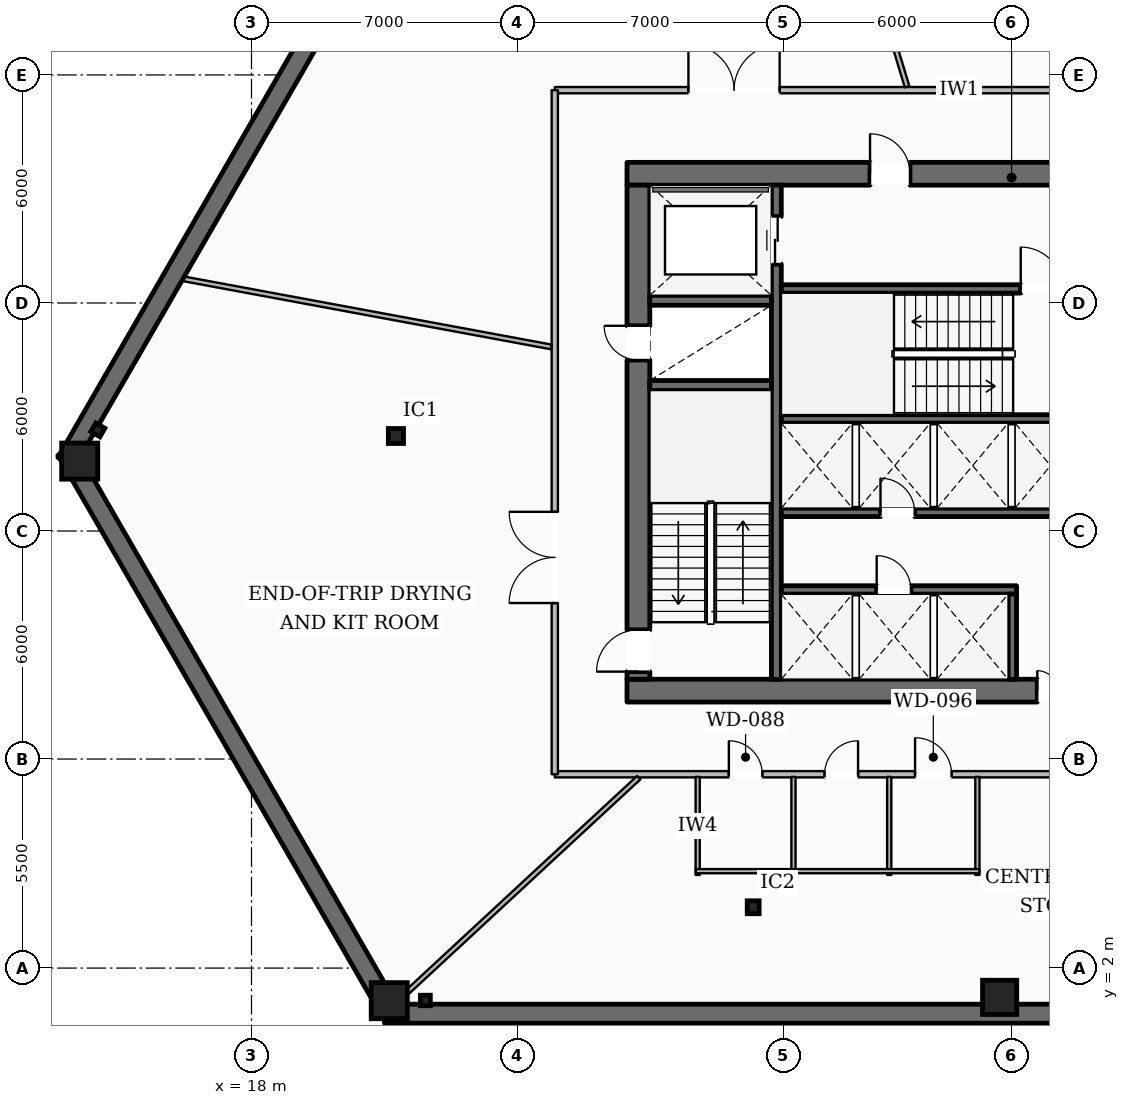
"""IFC4 building model, lengths in metres.
Left out: names, types, materials, properties, quantities, classifications, styles, units other than length and angle.
Written with IfcOpenShell. Run it as: python <this file> out.ifc"""

import sys

from ifc_helpers import new_model, si_unit, direction, frame, frame_2d, origin, origin_2d, place, context, subcontext, project, spatial, rectangle, hollow_rectangle, i_section, extrude, element, fill, save


model = new_model("IFC4")
c1 = context("Model", 3, precision=1e-05, world=origin(), true_north=direction((0.0, 1.0)))
c2 = subcontext(c1, "Body", "Model", "MODEL_VIEW")
j1 = project(units=[si_unit("LENGTHUNIT", "METRE"), si_unit("PLANEANGLEUNIT", "RADIAN")], contexts=[c1])
p1 = place(None, origin())
s1 = spatial("IfcSite", under=j1, at=p1, CompositionType="ELEMENT")
p2 = place(p1, origin())
s2 = spatial("IfcBuilding", under=s1, at=p2, CompositionType="ELEMENT")
p3 = place(p2, frame((0.0, 0.0, -4.2)))
s3 = spatial("IfcBuildingStorey", under=s2, at=p3, CompositionType="ELEMENT", Elevation=-4.2)
p4 = place(p3, frame((29.622, 43.889, 0.0), z_axis=(0.0, 0.0, 1.0), x_axis=(-0.499999749417, -0.866025548458, 0.0)))
e1 = element("IfcWall", 1, at=p4, inside=s3, PredefinedType="SHEAR", context=c2, shape_type="SweptSolid", body=[
    extrude(rectangle(XDim=33.0, YDim=0.5, at=frame_2d((16.5, 0.0))), origin(), (0.0, 0.0, 1.0), 3.94),
])
p5 = place(p3, frame((13.122, 15.618, 0.0), z_axis=(0.0, 0.0, 1.0), x_axis=(0.499998305863, -0.866026381893, 0.0)))
e2 = element("IfcWall", 2, at=p5, inside=s3, PredefinedType="SHEAR", context=c2, shape_type="SweptSolid", body=[
    extrude(rectangle(XDim=17.289, YDim=0.5, at=frame_2d((8.644, 0.0))), origin(), (0.0, 0.0, 1.0), 3.94),
])
p6 = place(p3, frame((21.5, 0.8, 0.0), z_axis=(0.0, 0.0, 1.0), x_axis=(1.0, 0.0, 0.0)))
e3 = element("IfcWall", 3, at=p6, inside=s3, PredefinedType="SHEAR", context=c2, shape_type="SweptSolid", body=[
    extrude(rectangle(XDim=33.0, YDim=0.5, at=frame_2d((16.5, 0.0))), origin(), (0.0, 0.0, 1.0), 3.94),
])
p7 = place(p3, frame((27.88, 9.3, 0.0), z_axis=(0.0, 0.0, 1.0), x_axis=(1.0, 0.0, 0.0)))
e4 = element("IfcWall", 4, at=p7, inside=s3, PredefinedType="SOLIDWALL", context=c2, shape_type="SweptSolid", body=[
    extrude(rectangle(XDim=20.24, YDim=0.6, at=frame_2d((10.12, 0.0))), origin(), (0.0, 0.0, 1.0), 3.94),
])
p8 = place(p7, frame((10.795, 0.0, 0.0)))
e5 = element("IfcOpeningElement", 5, at=p8, cuts=e4, PredefinedType="OPENING", context=c2, shape_type="SweptSolid", body=[
    extrude(rectangle(XDim=1.05, YDim=2.15, at=frame_2d((0.525, 1.075))), frame((0.0, 0.31, 0.0), z_axis=(0.0, -1.0, 0.0), x_axis=(1.0, 0.0, 0.0)), (0.0, 0.0, 1.0), 0.62),
])
p9 = place(p3, frame((27.88, 22.9, 0.0), z_axis=(0.0, 0.0, 1.0), x_axis=(1.0, 0.0, 0.0)))
e6 = element("IfcWall", 6, at=p9, inside=s3, PredefinedType="SOLIDWALL", context=c2, shape_type="SweptSolid", body=[
    extrude(rectangle(XDim=20.24, YDim=0.6, at=frame_2d((10.12, 0.0))), origin(), (0.0, 0.0, 1.0), 3.94),
])
p10 = place(p9, frame((6.395, 0.0, 0.0)))
e7 = element("IfcOpeningElement", 7, at=p10, cuts=e6, PredefinedType="OPENING", context=c2, shape_type="SweptSolid", body=[
    extrude(rectangle(XDim=1.05, YDim=2.15, at=frame_2d((0.525, 1.075))), frame((0.0, 0.31, 0.0), z_axis=(0.0, -1.0, 0.0), x_axis=(1.0, 0.0, 0.0)), (0.0, 0.0, 1.0), 0.62),
])
p11 = place(p9, frame((12.795, 0.0, 0.0)))
e8 = element("IfcOpeningElement", 8, at=p11, cuts=e6, PredefinedType="OPENING", context=c2, shape_type="SweptSolid", body=[
    extrude(rectangle(XDim=1.05, YDim=2.15, at=frame_2d((0.525, 1.075))), frame((0.0, 0.31, 0.0), z_axis=(0.0, -1.0, 0.0), x_axis=(1.0, 0.0, 0.0)), (0.0, 0.0, 1.0), 0.62),
])
p12 = place(p3, frame((28.18, 9.6, 0.0), z_axis=(0.0, 0.0, 1.0), x_axis=(0.0, 1.0, 0.0)))
e9 = element("IfcWall", 9, at=p12, inside=s3, PredefinedType="SOLIDWALL", context=c2, shape_type="SweptSolid", body=[
    extrude(rectangle(XDim=13.0, YDim=0.6, at=frame_2d((6.5, 0.0))), origin(), (0.0, 0.0, 1.0), 3.94),
])
p13 = place(p12, frame((0.2, 0.0, 0.0)))
e10 = element("IfcOpeningElement", 10, at=p13, cuts=e9, PredefinedType="OPENING", context=c2, shape_type="SweptSolid", body=[
    extrude(rectangle(XDim=1.1, YDim=2.15, at=frame_2d((0.55, 1.075))), frame((0.0, 0.31, 0.0), z_axis=(0.0, -1.0, 0.0), x_axis=(1.0, 0.0, 0.0)), (0.0, 0.0, 1.0), 0.62),
])
p14 = place(p12, frame((8.4, 0.0, 0.0)))
e11 = element("IfcOpeningElement", 11, at=p14, cuts=e9, PredefinedType="OPENING", context=c2, shape_type="SweptSolid", body=[
    extrude(rectangle(XDim=0.9, YDim=2.1, at=frame_2d((0.45, 1.05))), frame((0.0, 0.31, 0.0), z_axis=(0.0, -1.0, 0.0), x_axis=(1.0, 0.0, 0.0)), (0.0, 0.0, 1.0), 0.62),
])
p15 = place(p3, frame((31.81, 9.6, 0.0), z_axis=(0.0, 0.0, 1.0), x_axis=(0.0, 1.0, 0.0)))
e12 = element("IfcWall", 12, at=p15, inside=s3, PredefinedType="SHEAR", context=c2, shape_type="SweptSolid", body=[
    extrude(rectangle(XDim=13.0, YDim=0.26, at=frame_2d((6.5, 0.0))), origin(), (0.0, 0.0, 1.0), 3.94),
])
p16 = place(p15, frame((10.925, 0.0, 0.0)))
e13 = element("IfcOpeningElement", 13, at=p16, cuts=e12, PredefinedType="OPENING", context=c2, shape_type="SweptSolid", body=[
    extrude(rectangle(XDim=1.25, YDim=2.25, at=frame_2d((0.625, 1.125))), frame((0.0, 0.14, 0.0), z_axis=(0.0, -1.0, 0.0), x_axis=(1.0, 0.0, 0.0)), (0.0, 0.0, 1.0), 0.28),
])
for number, where, z_axis, x_axis in (
    (14, (28.48, 17.33, 0.0), (0.0, 0.0, 1.0), (1.0, 0.0, 0.0)),
    (15, (28.48, 19.57, 0.0), (0.0, 0.0, 1.0), (1.0, 0.0, 0.0)),
):
    element("IfcWall", number, at=place(p3, frame(where, z_axis=z_axis, x_axis=x_axis)), inside=s3, PredefinedType="SHEAR", context=c2, shape_type="SweptSolid", body=[
        extrude(rectangle(XDim=3.2, YDim=0.26, at=frame_2d((1.6, 0.0))), origin(), (0.0, 0.0, 1.0), 3.94),
    ])
p17 = place(p3, frame((31.94, 19.87, 0.0), z_axis=(0.0, 0.0, 1.0), x_axis=(1.0, 0.0, 0.0)))
e16 = element("IfcWall", 16, at=p17, inside=s3, PredefinedType="SOLIDWALL", context=c2, shape_type="SweptSolid", body=[
    extrude(rectangle(XDim=12.12, YDim=0.22, at=frame_2d((6.06, 0.0))), origin(), (0.0, 0.0, 1.0), 3.94),
])
p18 = place(p17, frame((6.3, 0.0, 0.0)))
e17 = element("IfcOpeningElement", 17, at=p18, cuts=e16, PredefinedType="OPENING", context=c2, shape_type="SweptSolid", body=[
    extrude(rectangle(XDim=1.1, YDim=2.15, at=frame_2d((0.55, 1.075))), frame((0.0, 0.12, 0.0), z_axis=(0.0, -1.0, 0.0), x_axis=(1.0, 0.0, 0.0)), (0.0, 0.0, 1.0), 0.24),
])
p19 = place(p17, frame((9.51, 0.0, 0.0)))
e18 = element("IfcOpeningElement", 18, at=p19, cuts=e16, PredefinedType="OPENING", context=c2, shape_type="SweptSolid", body=[
    extrude(rectangle(XDim=0.9, YDim=2.1, at=frame_2d((0.45, 1.05))), frame((0.0, 0.12, 0.0), z_axis=(0.0, -1.0, 0.0), x_axis=(1.0, 0.0, 0.0)), (0.0, 0.0, 1.0), 0.24),
])
p20 = place(p3, frame((31.94, 16.45, 0.0), z_axis=(0.0, 0.0, 1.0), x_axis=(1.0, 0.0, 0.0)))
e19 = element("IfcWall", 19, at=p20, inside=s3, PredefinedType="SOLIDWALL", context=c2, shape_type="SweptSolid", body=[
    extrude(rectangle(XDim=12.12, YDim=0.22, at=frame_2d((6.06, 0.0))), origin(), (0.0, 0.0, 1.0), 3.94),
])
p21 = place(p3, frame((31.94, 13.99, 0.0), z_axis=(0.0, 0.0, 1.0), x_axis=(1.0, 0.0, 0.0)))
e20 = element("IfcWall", 20, at=p21, inside=s3, PredefinedType="SOLIDWALL", context=c2, shape_type="SweptSolid", body=[
    extrude(rectangle(XDim=12.12, YDim=0.22, at=frame_2d((6.06, 0.0))), origin(), (0.0, 0.0, 1.0), 3.94),
])
p22 = place(p21, frame((2.61, 0.0, 0.0)))
e21 = element("IfcOpeningElement", 21, at=p22, cuts=e20, PredefinedType="OPENING", context=c2, shape_type="SweptSolid", body=[
    extrude(rectangle(XDim=0.9, YDim=2.1, at=frame_2d((0.45, 1.05))), frame((0.0, 0.12, 0.0), z_axis=(0.0, -1.0, 0.0), x_axis=(1.0, 0.0, 0.0)), (0.0, 0.0, 1.0), 0.24),
])
p23 = place(p3, frame((31.94, 11.95, 0.0), z_axis=(0.0, 0.0, 1.0), x_axis=(1.0, 0.0, 0.0)))
e22 = element("IfcWall", 22, at=p23, inside=s3, PredefinedType="SOLIDWALL", context=c2, shape_type="SweptSolid", body=[
    extrude(rectangle(XDim=6.19, YDim=0.22, at=frame_2d((3.095, 0.0))), origin(), (0.0, 0.0, 1.0), 3.94),
])
p24 = place(p23, frame((2.51, 0.0, 0.0)))
e23 = element("IfcOpeningElement", 23, at=p24, cuts=e22, PredefinedType="OPENING", context=c2, shape_type="SweptSolid", body=[
    extrude(rectangle(XDim=0.9, YDim=2.1, at=frame_2d((0.45, 1.05))), frame((0.0, 0.12, 0.0), z_axis=(0.0, -1.0, 0.0), x_axis=(1.0, 0.0, 0.0)), (0.0, 0.0, 1.0), 0.24),
])
p25 = place(p3, frame((38.02, 9.6, 0.0), z_axis=(0.0, 0.0, 1.0), x_axis=(0.0, 1.0, 0.0)))
e24 = element("IfcWall", 24, at=p25, inside=s3, PredefinedType="SOLIDWALL", context=c2, shape_type="SweptSolid", body=[
    extrude(rectangle(XDim=2.24, YDim=0.22, at=frame_2d((1.12, 0.0))), origin(), (0.0, 0.0, 1.0), 3.94),
])
for number, where, z_axis, x_axis in (
    (25, (13.48, 15.339, 0.0), (0.0, 0.0, 1.0), (1.0, 0.0, 0.0)),
    (26, (21.625, 1.142, 0.0), (0.0, 0.0, 1.0), (1.0, 0.0, 0.0)),
):
    element("IfcColumn", number, at=place(p3, frame(where, z_axis=z_axis, x_axis=x_axis)), inside=s3, PredefinedType="COLUMN", context=c2, shape_type="SweptSolid", body=[
        extrude(hollow_rectangle(XDim=0.95, YDim=0.95, WallThickness=0.04, at=origin_2d()), origin(), (0.0, 0.0, 1.0), 3.94),
    ])
p26 = place(p3, frame((37.685, 1.23, 0.0), z_axis=(0.0, 0.0, 1.0), x_axis=(1.0, 0.0, 0.0)))
e27 = element("IfcColumn", 27, at=p26, inside=s3, PredefinedType="COLUMN", context=c2, shape_type="SweptSolid", body=[
    extrude(hollow_rectangle(XDim=0.9, YDim=0.9, WallThickness=0.038, at=origin_2d()), origin(), (0.0, 0.0, 1.0), 3.94),
])
for number, where, z_axis, x_axis in (
    (28, (13.957, 16.161, 0.0), (0.0, 0.0, 1.0), (-0.502, -0.865, 0.0)),
    (29, (22.574, 1.148, 0.0), (0.0, 0.0, 1.0), (1.0, 0.005, 0.0)),
):
    element("IfcColumn", number, at=place(p3, frame(where, z_axis=z_axis, x_axis=x_axis)), inside=s3, PredefinedType="PILASTER", context=c2, shape_type="SweptSolid", body=[
        extrude(i_section(OverallWidth=0.261, OverallDepth=0.276, WebThickness=0.015, FlangeThickness=0.025, at=origin_2d()), origin(), (0.0, 0.0, 1.0), 3.94),
    ])
p27 = place(p3, frame((21.8, 16.0, 0.0), z_axis=(0.0, 0.0, 1.0), x_axis=(1.0, 0.0, 0.0)))
e30 = element("IfcColumn", 30, at=p27, inside=s3, PredefinedType="COLUMN", context=c2, shape_type="SweptSolid", body=[
    extrude(i_section(OverallWidth=0.399, OverallDepth=0.394, WebThickness=0.023, FlangeThickness=0.037, at=origin_2d()), origin(), (0.0, 0.0, 1.0), 3.94),
])
p28 = place(p3, frame((31.2, 3.6, 0.0), z_axis=(0.0, 0.0, 1.0), x_axis=(1.0, 0.0, 0.0)))
e31 = element("IfcColumn", 31, at=p28, inside=s3, PredefinedType="COLUMN", context=c2, shape_type="SweptSolid", body=[
    extrude(i_section(OverallWidth=0.314, OverallDepth=0.34, WebThickness=0.019, FlangeThickness=0.031, at=origin_2d()), origin(), (0.0, 0.0, 1.0), 3.94),
])
p29 = place(p3, frame((25.98, 25.1, 0.0), z_axis=(0.0, 0.0, 1.0), x_axis=(1.0, 0.0, 0.0)))
e32 = element("IfcWall", 32, at=p29, inside=s3, PredefinedType="PARTITIONING", context=c2, shape_type="SweptSolid", body=[
    extrude(rectangle(XDim=24.04, YDim=0.165, at=frame_2d((12.02, 0.0))), origin(), (0.0, 0.0, 1.0), 3.94),
])
p30 = place(p29, frame((15.372, 0.0, 0.0)))
e33 = element("IfcOpeningElement", 33, at=p30, cuts=e32, PredefinedType="OPENING", context=c2, shape_type="SweptSolid", body=[
    extrude(rectangle(XDim=2.4, YDim=2.4, at=frame_2d((1.2, 1.2))), frame((0.0, 0.093, 0.0), z_axis=(0.0, -1.0, 0.0), x_axis=(1.0, 0.0, 0.0)), (0.0, 0.0, 1.0), 0.185),
])
p31 = place(p29, frame((3.517, 0.0, 0.0)))
e34 = element("IfcOpeningElement", 34, at=p31, cuts=e32, PredefinedType="OPENING", context=c2, shape_type="SweptSolid", body=[
    extrude(rectangle(XDim=2.4, YDim=2.4, at=frame_2d((1.2, 1.2))), frame((0.0, 0.093, 0.0), z_axis=(0.0, -1.0, 0.0), x_axis=(1.0, 0.0, 0.0)), (0.0, 0.0, 1.0), 0.185),
])
p32 = place(p3, frame((25.98, 7.1, 0.0), z_axis=(0.0, 0.0, 1.0), x_axis=(1.0, 0.0, 0.0)))
e35 = element("IfcWall", 35, at=p32, inside=s3, PredefinedType="PARTITIONING", context=c2, shape_type="SweptSolid", body=[
    extrude(rectangle(XDim=24.04, YDim=0.165, at=frame_2d((12.02, 0.0))), origin(), (0.0, 0.0, 1.0), 3.94),
])
p33 = place(p32, frame((4.58, 0.0, 0.0)))
e36 = element("IfcOpeningElement", 36, at=p33, cuts=e35, PredefinedType="OPENING", context=c2, shape_type="SweptSolid", body=[
    extrude(rectangle(XDim=0.88, YDim=2.1, at=frame_2d((0.44, 1.05))), frame((0.0, 0.093, 0.0), z_axis=(0.0, -1.0, 0.0), x_axis=(1.0, 0.0, 0.0)), (0.0, 0.0, 1.0), 0.185),
])
p34 = place(p32, frame((7.1, 0.0, 0.0)))
e37 = element("IfcOpeningElement", 37, at=p34, cuts=e35, PredefinedType="OPENING", context=c2, shape_type="SweptSolid", body=[
    extrude(rectangle(XDim=0.88, YDim=2.1, at=frame_2d((0.44, 1.05))), frame((0.0, 0.093, 0.0), z_axis=(0.0, -1.0, 0.0), x_axis=(1.0, 0.0, 0.0)), (0.0, 0.0, 1.0), 0.185),
])
p35 = place(p32, frame((9.48, 0.0, 0.0)))
e38 = element("IfcOpeningElement", 38, at=p35, cuts=e35, PredefinedType="OPENING", context=c2, shape_type="SweptSolid", body=[
    extrude(rectangle(XDim=0.96, YDim=2.1, at=frame_2d((0.48, 1.05))), frame((0.0, 0.093, 0.0), z_axis=(0.0, -1.0, 0.0), x_axis=(1.0, 0.0, 0.0)), (0.0, 0.0, 1.0), 0.185),
])
p36 = place(p32, frame((15.229, 0.0, 0.0)))
e39 = element("IfcOpeningElement", 39, at=p36, cuts=e35, PredefinedType="OPENING", context=c2, shape_type="SweptSolid", body=[
    extrude(rectangle(XDim=2.4, YDim=2.4, at=frame_2d((1.2, 1.2))), frame((0.0, 0.093, 0.0), z_axis=(0.0, -1.0, 0.0), x_axis=(1.0, 0.0, 0.0)), (0.0, 0.0, 1.0), 0.185),
])
p37 = place(p3, frame((25.98, 7.1, 0.0), z_axis=(0.0, 0.0, 1.0), x_axis=(0.0, 1.0, 0.0)))
e40 = element("IfcWall", 40, at=p37, inside=s3, PredefinedType="PARTITIONING", context=c2, shape_type="SweptSolid", body=[
    extrude(rectangle(XDim=18.0, YDim=0.165, at=frame_2d((9.0, 0.0))), origin(), (0.0, 0.0, 1.0), 3.94),
])
p38 = place(p37, frame((4.505, 0.0, 0.0)))
e41 = element("IfcOpeningElement", 41, at=p38, cuts=e40, PredefinedType="OPENING", context=c2, shape_type="SweptSolid", body=[
    extrude(rectangle(XDim=2.4, YDim=2.4, at=frame_2d((1.2, 1.2))), frame((0.0, 0.093, 0.0), z_axis=(0.0, -1.0, 0.0), x_axis=(1.0, 0.0, 0.0)), (0.0, 0.0, 1.0), 0.185),
])
for number, where, z_axis, x_axis in (
    (42, (29.74, 4.45, 0.0), (0.0, 0.0, 1.0), (0.0, 1.0, 0.0)),
    (43, (32.26, 4.45, 0.0), (0.0, 0.0, 1.0), (0.0, 1.0, 0.0)),
    (44, (34.78, 4.45, 0.0), (0.0, 0.0, 1.0), (0.0, 1.0, 0.0)),
    (45, (37.1, 4.45, 0.0), (0.0, 0.0, 1.0), (0.0, 1.0, 0.0)),
):
    element("IfcWall", number, at=place(p3, frame(where, z_axis=z_axis, x_axis=x_axis)), inside=s3, PredefinedType="PLUMBINGWALL", context=c2, shape_type="SweptSolid", body=[
        extrude(rectangle(XDim=2.58, YDim=0.11, at=frame_2d((1.29, 0.0))), origin(), (0.0, 0.0, 1.0), 3.94),
    ])
p39 = place(p3, frame((29.69, 4.55, 0.0), z_axis=(0.0, 0.0, 1.0), x_axis=(1.0, 0.0, 0.0)))
e46 = element("IfcWall", 46, at=p39, inside=s3, PredefinedType="PLUMBINGWALL", context=c2, shape_type="SweptSolid", body=[
    extrude(rectangle(XDim=7.46, YDim=0.11, at=frame_2d((3.73, 0.0))), origin(), (0.0, 0.0, 1.0), 3.628),
])
p40 = place(p3, frame((35.249, 25.19, 0.0), z_axis=(0.0, 0.0, 1.0), x_axis=(-0.289619538285, 0.957141851057, 0.0)))
e47 = element("IfcWall", 47, at=p40, inside=s3, PredefinedType="PARTITIONING", context=c2, shape_type="SweptSolid", body=[
    extrude(rectangle(XDim=18.362, YDim=0.125, at=frame_2d((9.181, 0.0))), origin(), (0.0, 0.0, 1.0), 3.94),
])
p41 = place(p3, frame((25.889, 18.343, 0.0), z_axis=(0.0, 0.0, 1.0), x_axis=(-0.983273782179, 0.182133657733, 0.0)))
e48 = element("IfcWall", 48, at=p41, inside=s3, PredefinedType="PARTITIONING", context=c2, shape_type="SweptSolid", body=[
    extrude(rectangle(XDim=9.846, YDim=0.125, at=frame_2d((4.923, 0.0))), origin(), (0.0, 0.0, 1.0), 3.94),
])
p42 = place(p3, frame((28.189, 7.01, 0.0), z_axis=(0.0, 0.0, 1.0), x_axis=(-0.733538790589, -0.679647587137, 0.0)))
e49 = element("IfcWall", 49, at=p42, inside=s3, PredefinedType="PARTITIONING", context=c2, shape_type="SweptSolid", body=[
    extrude(rectangle(XDim=8.29, YDim=0.125, at=frame_2d((4.145, 0.0))), origin(), (0.0, 0.0, 1.0), 3.94),
])
p43 = place(p13, origin())
e50 = element("IfcDoor", 50, at=p43, inside=s3, OperationType="SINGLE_SWING_LEFT", PredefinedType="DOOR", context=c2, shape_type="SweptSolid", body=[
    extrude(rectangle(XDim=1.1, YDim=2.15, at=frame_2d((0.55, 1.075))), frame((0.0, 0.025, 0.0), z_axis=(0.0, -1.0, 0.0), x_axis=(1.0, 0.0, 0.0)), (0.0, 0.0, 1.0), 0.05),
])
fill(e10, e50)
p44 = place(p18, origin())
e51 = element("IfcDoor", 51, at=p44, inside=s3, OperationType="SINGLE_SWING_LEFT", PredefinedType="DOOR", context=c2, shape_type="SweptSolid", body=[
    extrude(rectangle(XDim=1.1, YDim=2.15, at=frame_2d((0.55, 1.075))), frame((0.0, 0.025, 0.0), z_axis=(0.0, -1.0, 0.0), x_axis=(1.0, 0.0, 0.0)), (0.0, 0.0, 1.0), 0.05),
])
fill(e17, e51)
p45 = place(p14, origin())
e52 = element("IfcDoor", 52, at=p45, inside=s3, OperationType="SINGLE_SWING_RIGHT", PredefinedType="DOOR", context=c2, shape_type="SweptSolid", body=[
    extrude(rectangle(XDim=0.9, YDim=2.1, at=frame_2d((0.45, 1.05))), frame((0.0, 0.025, 0.0), z_axis=(0.0, -1.0, 0.0), x_axis=(1.0, 0.0, 0.0)), (0.0, 0.0, 1.0), 0.05),
])
fill(e11, e52)
p46 = place(p10, origin())
e53 = element("IfcDoor", 53, at=p46, inside=s3, OperationType="SINGLE_SWING_LEFT", PredefinedType="DOOR", context=c2, shape_type="SweptSolid", body=[
    extrude(rectangle(XDim=1.05, YDim=2.15, at=frame_2d((0.525, 1.075))), frame((0.0, 0.025, 0.0), z_axis=(0.0, -1.0, 0.0), x_axis=(1.0, 0.0, 0.0)), (0.0, 0.0, 1.0), 0.05),
])
fill(e7, e53)
p47 = place(p16, origin())
e54 = element("IfcDoor", 54, at=p47, inside=s3, OperationType="DOUBLE_DOOR_SLIDING", PredefinedType="DOOR", context=c2, shape_type="SweptSolid", body=[
    extrude(rectangle(XDim=1.25, YDim=2.25, at=frame_2d((0.625, 1.125))), frame((0.0, 0.025, 0.0), z_axis=(0.0, -1.0, 0.0), x_axis=(1.0, 0.0, 0.0)), (0.0, 0.0, 1.0), 0.05),
])
fill(e13, e54)
p48 = place(p8, origin())
e55 = element("IfcDoor", 55, at=p48, inside=s3, OperationType="DOUBLE_DOOR_SINGLE_SWING", PredefinedType="DOOR", context=c2, shape_type="SweptSolid", body=[
    extrude(rectangle(XDim=1.05, YDim=2.15, at=frame_2d((0.525, 1.075))), frame((0.0, 0.025, 0.0), z_axis=(0.0, -1.0, 0.0), x_axis=(1.0, 0.0, 0.0)), (0.0, 0.0, 1.0), 0.05),
])
fill(e5, e55)
p49 = place(p24, origin())
e56 = element("IfcDoor", 56, at=p49, inside=s3, OperationType="SINGLE_SWING_LEFT", PredefinedType="DOOR", context=c2, shape_type="SweptSolid", body=[
    extrude(rectangle(XDim=0.9, YDim=2.1, at=frame_2d((0.45, 1.05))), frame((0.0, 0.025, 0.0), z_axis=(0.0, -1.0, 0.0), x_axis=(1.0, 0.0, 0.0)), (0.0, 0.0, 1.0), 0.05),
])
fill(e23, e56)
p50 = place(p22, origin())
e57 = element("IfcDoor", 57, at=p50, inside=s3, OperationType="SINGLE_SWING_LEFT", PredefinedType="DOOR", context=c2, shape_type="SweptSolid", body=[
    extrude(rectangle(XDim=0.9, YDim=2.1, at=frame_2d((0.45, 1.05))), frame((0.0, 0.025, 0.0), z_axis=(0.0, -1.0, 0.0), x_axis=(1.0, 0.0, 0.0)), (0.0, 0.0, 1.0), 0.05),
])
fill(e21, e57)
p51 = place(p33, origin())
e58 = element("IfcDoor", 58, at=p51, inside=s3, OperationType="SINGLE_SWING_LEFT", PredefinedType="DOOR", context=c2, shape_type="SweptSolid", body=[
    extrude(rectangle(XDim=0.88, YDim=2.1, at=frame_2d((0.44, 1.05))), frame((0.0, 0.025, 0.0), z_axis=(0.0, -1.0, 0.0), x_axis=(1.0, 0.0, 0.0)), (0.0, 0.0, 1.0), 0.05),
])
fill(e36, e58)
p52 = place(p34, origin())
e59 = element("IfcDoor", 59, at=p52, inside=s3, OperationType="SINGLE_SWING_RIGHT", PredefinedType="DOOR", context=c2, shape_type="SweptSolid", body=[
    extrude(rectangle(XDim=0.88, YDim=2.1, at=frame_2d((0.44, 1.05))), frame((0.0, 0.025, 0.0), z_axis=(0.0, -1.0, 0.0), x_axis=(1.0, 0.0, 0.0)), (0.0, 0.0, 1.0), 0.05),
])
fill(e37, e59)
p53 = place(p35, origin())
e60 = element("IfcDoor", 60, at=p53, inside=s3, OperationType="SINGLE_SWING_LEFT", PredefinedType="DOOR", context=c2, shape_type="SweptSolid", body=[
    extrude(rectangle(XDim=0.96, YDim=2.1, at=frame_2d((0.48, 1.05))), frame((0.0, 0.025, 0.0), z_axis=(0.0, -1.0, 0.0), x_axis=(1.0, 0.0, 0.0)), (0.0, 0.0, 1.0), 0.05),
])
fill(e38, e60)
p54 = place(p31, origin())
e61 = element("IfcDoor", 61, at=p54, inside=s3, OperationType="DOUBLE_DOOR_SINGLE_SWING", PredefinedType="GATE", context=c2, shape_type="SweptSolid", body=[
    extrude(rectangle(XDim=2.4, YDim=2.4, at=frame_2d((1.2, 1.2))), frame((0.0, 0.025, 0.0), z_axis=(0.0, -1.0, 0.0), x_axis=(1.0, 0.0, 0.0)), (0.0, 0.0, 1.0), 0.05),
])
fill(e34, e61)
p55 = place(p38, origin())
e62 = element("IfcDoor", 62, at=p55, inside=s3, OperationType="DOUBLE_DOOR_SINGLE_SWING", PredefinedType="GATE", context=c2, shape_type="SweptSolid", body=[
    extrude(rectangle(XDim=2.4, YDim=2.4, at=frame_2d((1.2, 1.2))), frame((0.0, 0.025, 0.0), z_axis=(0.0, -1.0, 0.0), x_axis=(1.0, 0.0, 0.0)), (0.0, 0.0, 1.0), 0.05),
])
fill(e41, e62)
save(model, sys.argv[1])
